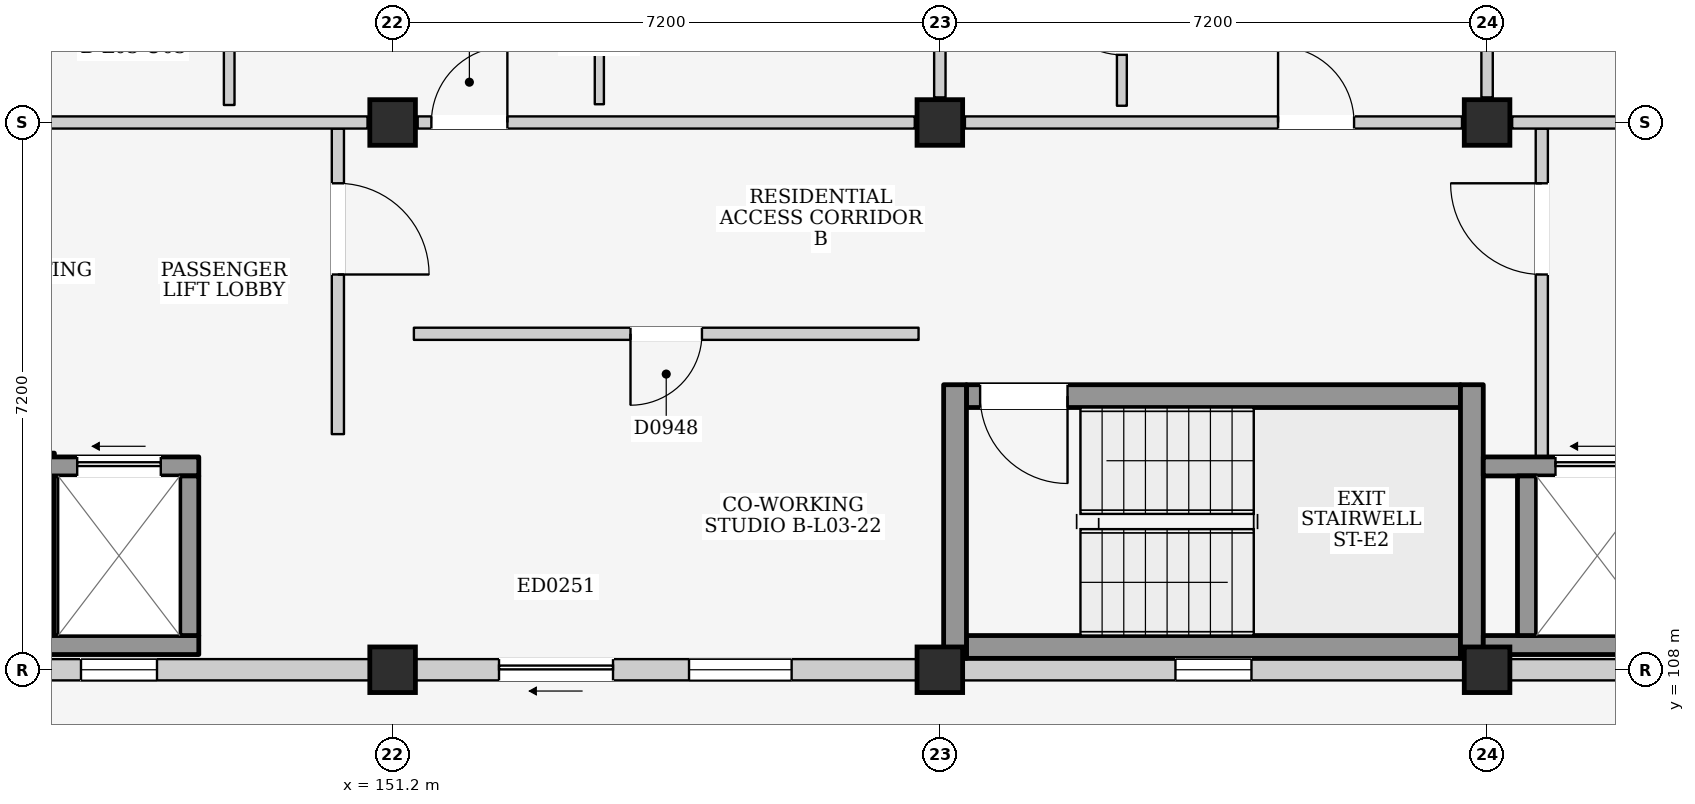
"""IFC4 building model, lengths in metres.
Left out: names, types, materials, properties, quantities, classifications, styles, units other than length and angle.
Written with IfcOpenShell. Run it as: python <this file> out.ifc"""

import sys

from ifc_helpers import new_model, si_unit, direction, frame, frame_2d, origin, origin_2d, place, context, subcontext, project, spatial, rectangle, extrude, element, fill, save


model = new_model("IFC4")
c1 = context("Model", 3, precision=1e-05, world=origin(), true_north=direction((0.0, 1.0)))
c2 = subcontext(c1, "Body", "Model", "MODEL_VIEW")
j1 = project(units=[si_unit("LENGTHUNIT", "METRE"), si_unit("PLANEANGLEUNIT", "RADIAN")], contexts=[c1])
p1 = place(None, origin())
s1 = spatial("IfcSite", under=j1, at=p1, CompositionType="ELEMENT")
p2 = place(p1, origin())
s2 = spatial("IfcBuilding", under=s1, at=p2, CompositionType="ELEMENT")
p3 = place(p2, frame((0.0, 0.0, 12.2)))
s3 = spatial("IfcBuildingStorey", under=s2, at=p3, CompositionType="ELEMENT", Elevation=12.2)
for number, where, z_axis, x_axis in (
    (1, (151.2, 108.0, 0.0), (0.0, 0.0, 1.0), (1.0, 0.0, 0.0)),
    (2, (151.2, 115.2, 0.0), (0.0, 0.0, 1.0), (1.0, 0.0, 0.0)),
    (3, (158.4, 108.0, 0.0), (0.0, 0.0, 1.0), (1.0, 0.0, 0.0)),
    (4, (158.4, 115.2, 0.0), (0.0, 0.0, 1.0), (1.0, 0.0, 0.0)),
    (5, (165.6, 108.0, 0.0), (0.0, 0.0, 1.0), (1.0, 0.0, 0.0)),
    (6, (165.6, 115.2, 0.0), (0.0, 0.0, 1.0), (1.0, 0.0, 0.0)),
):
    element("IfcColumn", number, at=place(p3, frame(where, z_axis=z_axis, x_axis=x_axis)), inside=s3, PredefinedType="COLUMN", context=c2, shape_type="SweptSolid", body=[
        extrude(rectangle(XDim=0.6, YDim=0.6, at=origin_2d()), origin(), (0.0, 0.0, 1.0), 3.2),
    ])
p4 = place(p3, frame((144.3, 108.0, 0.0), z_axis=(0.0, 0.0, 1.0), x_axis=(1.0, 0.0, 0.0)))
e7 = element("IfcWall", 7, at=p4, inside=s3, PredefinedType="ELEMENTEDWALL", context=c2, shape_type="SweptSolid", body=[
    extrude(rectangle(XDim=6.6, YDim=0.28, at=frame_2d((3.3, 0.0))), origin(), (0.0, 0.0, 1.0), 2.365),
])
p5 = place(p4, frame((2.8, 0.0, 1.2)))
e8 = element("IfcOpeningElement", 8, at=p5, cuts=e7, PredefinedType="OPENING", context=c2, shape_type="SweptSolid", body=[
    extrude(rectangle(XDim=1.0, YDim=0.9, at=frame_2d((0.5, 0.45))), frame((0.0, 0.155, 0.0), z_axis=(0.0, -1.0, 0.0), x_axis=(1.0, 0.0, 0.0)), (0.0, 0.0, 1.0), 0.31),
])
p6 = place(p3, frame((151.5, 108.0, 0.0), z_axis=(0.0, 0.0, 1.0), x_axis=(1.0, 0.0, 0.0)))
e9 = element("IfcWall", 9, at=p6, inside=s3, PredefinedType="ELEMENTEDWALL", context=c2, shape_type="SweptSolid", body=[
    extrude(rectangle(XDim=6.6, YDim=0.28, at=frame_2d((3.3, 0.0))), origin(), (0.0, 0.0, 1.0), 2.365),
])
p7 = place(p6, frame((1.1, 0.0, 0.0)))
e10 = element("IfcOpeningElement", 10, at=p7, cuts=e9, PredefinedType="OPENING", context=c2, shape_type="SweptSolid", body=[
    extrude(rectangle(XDim=1.5, YDim=2.12, at=frame_2d((0.75, 1.06))), frame((0.0, 0.155, 0.0), z_axis=(0.0, -1.0, 0.0), x_axis=(1.0, 0.0, 0.0)), (0.0, 0.0, 1.0), 0.31),
])
p8 = place(p6, frame((3.6, 0.0, 0.755)))
e11 = element("IfcOpeningElement", 11, at=p8, cuts=e9, PredefinedType="OPENING", context=c2, shape_type="SweptSolid", body=[
    extrude(rectangle(XDim=1.35, YDim=1.5, at=frame_2d((0.675, 0.75))), frame((0.0, 0.155, 0.0), z_axis=(0.0, -1.0, 0.0), x_axis=(1.0, 0.0, 0.0)), (0.0, 0.0, 1.0), 0.31),
])
p9 = place(p3, frame((158.7, 108.0, 0.0), z_axis=(0.0, 0.0, 1.0), x_axis=(1.0, 0.0, 0.0)))
e12 = element("IfcWall", 12, at=p9, inside=s3, PredefinedType="ELEMENTEDWALL", context=c2, shape_type="SweptSolid", body=[
    extrude(rectangle(XDim=6.6, YDim=0.28, at=frame_2d((3.3, 0.0))), origin(), (0.0, 0.0, 1.0), 2.365),
])
p10 = place(p9, frame((2.8, 0.0, 1.2)))
e13 = element("IfcOpeningElement", 13, at=p10, cuts=e12, PredefinedType="OPENING", context=c2, shape_type="SweptSolid", body=[
    extrude(rectangle(XDim=1.0, YDim=0.9, at=frame_2d((0.5, 0.45))), frame((0.0, 0.155, 0.0), z_axis=(0.0, -1.0, 0.0), x_axis=(1.0, 0.0, 0.0)), (0.0, 0.0, 1.0), 0.31),
])
p11 = place(p3, frame((165.9, 108.0, 0.0), z_axis=(0.0, 0.0, 1.0), x_axis=(1.0, 0.0, 0.0)))
e14 = element("IfcWall", 14, at=p11, inside=s3, PredefinedType="ELEMENTEDWALL", context=c2, shape_type="SweptSolid", body=[
    extrude(rectangle(XDim=6.6, YDim=0.28, at=frame_2d((3.3, 0.0))), origin(), (0.0, 0.0, 1.0), 2.365),
])
p12 = place(p11, frame((2.8, 0.0, 1.2)))
e15 = element("IfcOpeningElement", 15, at=p12, cuts=e14, PredefinedType="OPENING", context=c2, shape_type="SweptSolid", body=[
    extrude(rectangle(XDim=1.0, YDim=0.9, at=frame_2d((0.5, 0.45))), frame((0.0, 0.155, 0.0), z_axis=(0.0, -1.0, 0.0), x_axis=(1.0, 0.0, 0.0)), (0.0, 0.0, 1.0), 0.31),
])
p13 = place(p3, frame((150.48, 111.1, 0.0), z_axis=(0.0, 0.0, 1.0), x_axis=(0.0, 1.0, 0.0)))
e16 = element("IfcWall", 16, at=p13, inside=s3, PredefinedType="PARTITIONING", context=c2, shape_type="SweptSolid", body=[
    extrude(rectangle(XDim=4.02, YDim=0.16, at=frame_2d((2.01, 0.0))), origin(), (0.0, 0.0, 1.0), 2.98),
])
p14 = place(p13, frame((2.1, 0.0, 0.0)))
e17 = element("IfcOpeningElement", 17, at=p14, cuts=e16, PredefinedType="OPENING", context=c2, shape_type="SweptSolid", body=[
    extrude(rectangle(XDim=1.2, YDim=2.2, at=frame_2d((0.6, 1.1))), frame((0.0, 0.095, 0.0), z_axis=(0.0, -1.0, 0.0), x_axis=(1.0, 0.0, 0.0)), (0.0, 0.0, 1.0), 0.19),
])
p15 = place(p3, frame((146.625, 108.45, 0.0), z_axis=(0.0, 0.0, 1.0), x_axis=(0.0, 1.0, 0.0)))
e18 = element("IfcWall", 18, at=p15, inside=s3, PredefinedType="SHEAR", context=c2, shape_type="SweptSolid", body=[
    extrude(rectangle(XDim=2.4, YDim=0.25, at=frame_2d((1.2, 0.0))), origin(), (0.0, 0.0, 1.0), 2.98),
])
p16 = place(p3, frame((146.625, 108.325, 0.0), z_axis=(0.0, 0.0, 1.0), x_axis=(1.0, 0.0, 0.0)))
e19 = element("IfcWall", 19, at=p16, inside=s3, PredefinedType="SHEAR", context=c2, shape_type="SweptSolid", body=[
    extrude(rectangle(XDim=2.025, YDim=0.25, at=frame_2d((1.012, 0.0))), origin(), (0.0, 0.0, 1.0), 2.98),
])
p17 = place(p3, frame((146.625, 110.675, 0.0), z_axis=(0.0, 0.0, 1.0), x_axis=(1.0, 0.0, 0.0)))
e20 = element("IfcWall", 20, at=p17, inside=s3, PredefinedType="SHEAR", context=c2, shape_type="SweptSolid", body=[
    extrude(rectangle(XDim=2.025, YDim=0.25, at=frame_2d((1.012, 0.0))), origin(), (0.0, 0.0, 1.0), 2.98),
])
p18 = place(p17, frame((0.425, 0.0, 0.0)))
e21 = element("IfcOpeningElement", 21, at=p18, cuts=e20, PredefinedType="OPENING", context=c2, shape_type="SweptSolid", body=[
    extrude(rectangle(XDim=1.1, YDim=2.15, at=frame_2d((0.55, 1.075))), frame((0.0, 0.14, 0.0), z_axis=(0.0, -1.0, 0.0), x_axis=(1.0, 0.0, 0.0)), (0.0, 0.0, 1.0), 0.28),
])
p19 = place(p3, frame((148.525, 108.45, 0.0), z_axis=(0.0, 0.0, 1.0), x_axis=(0.0, 1.0, 0.0)))
e22 = element("IfcWall", 22, at=p19, inside=s3, PredefinedType="SHEAR", context=c2, shape_type="SweptSolid", body=[
    extrude(rectangle(XDim=2.1, YDim=0.25, at=frame_2d((1.05, 0.0))), origin(), (0.0, 0.0, 1.0), 2.98),
])
p20 = place(p3, frame((158.75, 108.3, 0.0), z_axis=(0.0, 0.0, 1.0), x_axis=(1.0, 0.0, 0.0)))
e23 = element("IfcWall", 23, at=p20, inside=s3, PredefinedType="SHEAR", context=c2, shape_type="SweptSolid", body=[
    extrude(rectangle(XDim=6.5, YDim=0.3, at=frame_2d((3.25, 0.0))), origin(), (0.0, 0.0, 1.0), 2.98),
])
p21 = place(p3, frame((158.75, 111.6, 0.0), z_axis=(0.0, 0.0, 1.0), x_axis=(1.0, 0.0, 0.0)))
e24 = element("IfcWall", 24, at=p21, inside=s3, PredefinedType="SHEAR", context=c2, shape_type="SweptSolid", body=[
    extrude(rectangle(XDim=6.5, YDim=0.3, at=frame_2d((3.25, 0.0))), origin(), (0.0, 0.0, 1.0), 2.98),
])
p22 = place(p21, frame((0.18, 0.0, 0.0)))
e25 = element("IfcOpeningElement", 25, at=p22, cuts=e24, PredefinedType="OPENING", context=c2, shape_type="SweptSolid", body=[
    extrude(rectangle(XDim=1.15, YDim=2.2, at=frame_2d((0.575, 1.1))), frame((0.0, 0.165, 0.0), z_axis=(0.0, -1.0, 0.0), x_axis=(1.0, 0.0, 0.0)), (0.0, 0.0, 1.0), 0.33),
])
for number, where, z_axis, x_axis in (
    (26, (158.6, 108.15, 0.0), (0.0, 0.0, 1.0), (0.0, 1.0, 0.0)),
    (27, (165.4, 108.15, 0.0), (0.0, 0.0, 1.0), (0.0, 1.0, 0.0)),
):
    element("IfcWall", number, at=place(p3, frame(where, z_axis=z_axis, x_axis=x_axis)), inside=s3, PredefinedType="SHEAR", context=c2, shape_type="SweptSolid", body=[
        extrude(rectangle(XDim=3.6, YDim=0.3, at=frame_2d((1.8, 0.0))), origin(), (0.0, 0.0, 1.0), 2.98),
    ])
p23 = place(p3, frame((166.32, 110.8, 0.0), z_axis=(0.0, 0.0, 1.0), x_axis=(0.0, 1.0, 0.0)))
e28 = element("IfcWall", 28, at=p23, inside=s3, PredefinedType="PARTITIONING", context=c2, shape_type="SweptSolid", body=[
    extrude(rectangle(XDim=4.32, YDim=0.16, at=frame_2d((2.16, 0.0))), origin(), (0.0, 0.0, 1.0), 2.98),
])
p24 = place(p23, frame((2.4, 0.0, 0.0)))
e29 = element("IfcOpeningElement", 29, at=p24, cuts=e28, PredefinedType="OPENING", context=c2, shape_type="SweptSolid", body=[
    extrude(rectangle(XDim=1.2, YDim=2.2, at=frame_2d((0.6, 1.1))), frame((0.0, 0.095, 0.0), z_axis=(0.0, -1.0, 0.0), x_axis=(1.0, 0.0, 0.0)), (0.0, 0.0, 1.0), 0.19),
])
p25 = place(p3, frame((165.55, 108.325, 0.0), z_axis=(0.0, 0.0, 1.0), x_axis=(1.0, 0.0, 0.0)))
e30 = element("IfcWall", 30, at=p25, inside=s3, PredefinedType="SHEAR", context=c2, shape_type="SweptSolid", body=[
    extrude(rectangle(XDim=2.55, YDim=0.25, at=frame_2d((1.275, 0.0))), origin(), (0.0, 0.0, 1.0), 2.98),
])
p26 = place(p3, frame((165.55, 110.675, 0.0), z_axis=(0.0, 0.0, 1.0), x_axis=(1.0, 0.0, 0.0)))
e31 = element("IfcWall", 31, at=p26, inside=s3, PredefinedType="SHEAR", context=c2, shape_type="SweptSolid", body=[
    extrude(rectangle(XDim=2.55, YDim=0.25, at=frame_2d((1.275, 0.0))), origin(), (0.0, 0.0, 1.0), 2.98),
])
p27 = place(p26, frame((0.95, 0.0, 0.0)))
e32 = element("IfcOpeningElement", 32, at=p27, cuts=e31, PredefinedType="OPENING", context=c2, shape_type="SweptSolid", body=[
    extrude(rectangle(XDim=1.1, YDim=2.15, at=frame_2d((0.55, 1.075))), frame((0.0, 0.14, 0.0), z_axis=(0.0, -1.0, 0.0), x_axis=(1.0, 0.0, 0.0)), (0.0, 0.0, 1.0), 0.28),
])
p28 = place(p3, frame((166.125, 108.45, 0.0), z_axis=(0.0, 0.0, 1.0), x_axis=(0.0, 1.0, 0.0)))
e33 = element("IfcWall", 33, at=p28, inside=s3, PredefinedType="SHEAR", context=c2, shape_type="SweptSolid", body=[
    extrude(rectangle(XDim=2.1, YDim=0.25, at=frame_2d((1.05, 0.0))), origin(), (0.0, 0.0, 1.0), 2.98),
])
p29 = place(p3, frame((144.33, 115.2, 0.0), z_axis=(0.0, 0.0, 1.0), x_axis=(1.0, 0.0, 0.0)))
e34 = element("IfcWall", 34, at=p29, inside=s3, PredefinedType="PARTITIONING", context=c2, shape_type="SweptSolid", body=[
    extrude(rectangle(XDim=6.54, YDim=0.16, at=frame_2d((3.27, 0.0))), origin(), (0.0, 0.0, 1.0), 2.365),
])
p30 = place(p3, frame((151.53, 115.2, 0.0), z_axis=(0.0, 0.0, 1.0), x_axis=(1.0, 0.0, 0.0)))
e35 = element("IfcWall", 35, at=p30, inside=s3, PredefinedType="PARTITIONING", context=c2, shape_type="SweptSolid", body=[
    extrude(rectangle(XDim=6.54, YDim=0.16, at=frame_2d((3.27, 0.0))), origin(), (0.0, 0.0, 1.0), 2.365),
])
p31 = place(p30, frame((0.18, 0.0, 0.0)))
e36 = element("IfcOpeningElement", 36, at=p31, cuts=e35, PredefinedType="OPENING", context=c2, shape_type="SweptSolid", body=[
    extrude(rectangle(XDim=1.0, YDim=2.15, at=frame_2d((0.5, 1.075))), frame((0.0, 0.095, 0.0), z_axis=(0.0, -1.0, 0.0), x_axis=(1.0, 0.0, 0.0)), (0.0, 0.0, 1.0), 0.19),
])
p32 = place(p3, frame((158.4, 115.53, 0.0), z_axis=(0.0, 0.0, 1.0), x_axis=(0.0, 1.0, 0.0)))
e37 = element("IfcWall", 37, at=p32, inside=s3, PredefinedType="PARTITIONING", context=c2, shape_type="SweptSolid", body=[
    extrude(rectangle(XDim=6.54, YDim=0.15, at=frame_2d((3.27, 0.0))), origin(), (0.0, 0.0, 1.0), 2.415),
])
p33 = place(p3, frame((149.05, 115.43, 0.0), z_axis=(0.0, 0.0, 1.0), x_axis=(0.0, 1.0, 0.0)))
e38 = element("IfcWall", 38, at=p33, inside=s3, PredefinedType="PARTITIONING", context=c2, shape_type="SweptSolid", body=[
    extrude(rectangle(XDim=3.06, YDim=0.14, at=frame_2d((1.53, 0.0))), origin(), (0.0, 0.0, 1.0), 2.98),
])
p34 = place(p3, frame((153.92, 115.44, 0.0), z_axis=(0.0, 0.0, 1.0), x_axis=(0.0, 1.0, 0.0)))
e39 = element("IfcWall", 39, at=p34, inside=s3, PredefinedType="PARTITIONING", context=c2, shape_type="SweptSolid", body=[
    extrude(rectangle(XDim=3.04, YDim=0.12, at=frame_2d((1.52, 0.0))), origin(), (0.0, 0.0, 1.0), 2.98),
])
p35 = place(p34, frame((1.04, 0.0, 0.0)))
e40 = element("IfcOpeningElement", 40, at=p35, cuts=e39, PredefinedType="OPENING", context=c2, shape_type="SweptSolid", body=[
    extrude(rectangle(XDim=0.96, YDim=2.15, at=frame_2d((0.48, 1.075))), frame((0.0, 0.075, 0.0), z_axis=(0.0, -1.0, 0.0), x_axis=(1.0, 0.0, 0.0)), (0.0, 0.0, 1.0), 0.15),
])
p36 = place(p3, frame((158.73, 115.2, 0.0), z_axis=(0.0, 0.0, 1.0), x_axis=(1.0, 0.0, 0.0)))
e41 = element("IfcWall", 41, at=p36, inside=s3, PredefinedType="PARTITIONING", context=c2, shape_type="SweptSolid", body=[
    extrude(rectangle(XDim=6.54, YDim=0.16, at=frame_2d((3.27, 0.0))), origin(), (0.0, 0.0, 1.0), 2.365),
])
p37 = place(p36, frame((4.12, 0.0, 0.0)))
e42 = element("IfcOpeningElement", 42, at=p37, cuts=e41, PredefinedType="OPENING", context=c2, shape_type="SweptSolid", body=[
    extrude(rectangle(XDim=1.0, YDim=2.15, at=frame_2d((0.5, 1.075))), frame((0.0, 0.095, 0.0), z_axis=(0.0, -1.0, 0.0), x_axis=(1.0, 0.0, 0.0)), (0.0, 0.0, 1.0), 0.19),
])
p38 = place(p3, frame((165.6, 115.53, 0.0), z_axis=(0.0, 0.0, 1.0), x_axis=(0.0, 1.0, 0.0)))
e43 = element("IfcWall", 43, at=p38, inside=s3, PredefinedType="PARTITIONING", context=c2, shape_type="SweptSolid", body=[
    extrude(rectangle(XDim=6.54, YDim=0.15, at=frame_2d((3.27, 0.0))), origin(), (0.0, 0.0, 1.0), 2.415),
])
p39 = place(p3, frame((160.795, 115.42, 0.0), z_axis=(0.0, 0.0, 1.0), x_axis=(0.0, 1.0, 0.0)))
e44 = element("IfcWall", 44, at=p39, inside=s3, PredefinedType="PARTITIONING", context=c2, shape_type="SweptSolid", body=[
    extrude(rectangle(XDim=2.22, YDim=0.13, at=frame_2d((1.11, 0.0))), origin(), (0.0, 0.0, 1.0), 2.98),
])
p40 = place(p39, frame((0.67, 0.0, 0.0)))
e45 = element("IfcOpeningElement", 45, at=p40, cuts=e44, PredefinedType="OPENING", context=c2, shape_type="SweptSolid", body=[
    extrude(rectangle(XDim=0.88, YDim=2.1, at=frame_2d((0.44, 1.05))), frame((0.0, 0.08, 0.0), z_axis=(0.0, -1.0, 0.0), x_axis=(1.0, 0.0, 0.0)), (0.0, 0.0, 1.0), 0.16),
])
p41 = place(p3, frame((165.93, 115.2, 0.0), z_axis=(0.0, 0.0, 1.0), x_axis=(1.0, 0.0, 0.0)))
e46 = element("IfcWall", 46, at=p41, inside=s3, PredefinedType="PARTITIONING", context=c2, shape_type="SweptSolid", body=[
    extrude(rectangle(XDim=6.54, YDim=0.16, at=frame_2d((3.27, 0.0))), origin(), (0.0, 0.0, 1.0), 2.365),
])
p42 = place(p3, frame((151.48, 112.42, 0.0), z_axis=(0.0, 0.0, 1.0), x_axis=(1.0, 0.0, 0.0)))
e47 = element("IfcWall", 47, at=p42, inside=s3, PredefinedType="PARTITIONING", context=c2, shape_type="SweptSolid", body=[
    extrude(rectangle(XDim=6.64, YDim=0.16, at=frame_2d((3.32, 0.0))), origin(), (0.0, 0.0, 1.0), 2.98),
])
p43 = place(p42, frame((2.85, 0.0, 0.0)))
e48 = element("IfcOpeningElement", 48, at=p43, cuts=e47, PredefinedType="OPENING", context=c2, shape_type="SweptSolid", body=[
    extrude(rectangle(XDim=0.94, YDim=2.12, at=frame_2d((0.47, 1.06))), frame((0.0, 0.095, 0.0), z_axis=(0.0, -1.0, 0.0), x_axis=(1.0, 0.0, 0.0)), (0.0, 0.0, 1.0), 0.19),
])
p44 = place(p5, origin())
e49 = element("IfcWindow", 49, at=p44, inside=s3, PartitioningType="SINGLE_PANEL", PredefinedType="WINDOW", context=c2, shape_type="SweptSolid", body=[
    extrude(rectangle(XDim=1.0, YDim=0.9, at=frame_2d((0.5, 0.45))), frame((0.0, 0.03, 0.0), z_axis=(0.0, -1.0, 0.0), x_axis=(1.0, 0.0, 0.0)), (0.0, 0.0, 1.0), 0.06),
])
fill(e8, e49)
p45 = place(p7, frame((1.5, 0.0, 0.0), z_axis=(0.0, 0.0, 1.0), x_axis=(-1.0, 0.0, 0.0)))
e50 = element("IfcDoor", 50, at=p45, inside=s3, OperationType="SLIDING_TO_LEFT", PredefinedType="DOOR", context=c2, shape_type="SweptSolid", body=[
    extrude(rectangle(XDim=1.5, YDim=2.12, at=frame_2d((0.75, 1.06))), frame((0.0, 0.025, 0.0), z_axis=(0.0, -1.0, 0.0), x_axis=(1.0, 0.0, 0.0)), (0.0, 0.0, 1.0), 0.05),
])
fill(e10, e50)
p46 = place(p8, origin())
e51 = element("IfcWindow", 51, at=p46, inside=s3, PartitioningType="SINGLE_PANEL", PredefinedType="WINDOW", context=c2, shape_type="SweptSolid", body=[
    extrude(rectangle(XDim=1.35, YDim=1.5, at=frame_2d((0.675, 0.75))), frame((0.0, 0.03, 0.0), z_axis=(0.0, -1.0, 0.0), x_axis=(1.0, 0.0, 0.0)), (0.0, 0.0, 1.0), 0.06),
])
fill(e11, e51)
p47 = place(p10, origin())
e52 = element("IfcWindow", 52, at=p47, inside=s3, PartitioningType="SINGLE_PANEL", PredefinedType="WINDOW", context=c2, shape_type="SweptSolid", body=[
    extrude(rectangle(XDim=1.0, YDim=0.9, at=frame_2d((0.5, 0.45))), frame((0.0, 0.03, 0.0), z_axis=(0.0, -1.0, 0.0), x_axis=(1.0, 0.0, 0.0)), (0.0, 0.0, 1.0), 0.06),
])
fill(e13, e52)
p48 = place(p14, frame((1.2, 0.0, 0.0), z_axis=(0.0, 0.0, 1.0), x_axis=(-1.0, 0.0, 0.0)))
e53 = element("IfcDoor", 53, at=p48, inside=s3, OperationType="SINGLE_SWING_RIGHT", PredefinedType="DOOR", context=c2, shape_type="SweptSolid", body=[
    extrude(rectangle(XDim=1.2, YDim=2.2, at=frame_2d((0.6, 1.1))), frame((0.0, 0.025, 0.0), z_axis=(0.0, -1.0, 0.0), x_axis=(1.0, 0.0, 0.0)), (0.0, 0.0, 1.0), 0.05),
])
fill(e17, e53)
p49 = place(p18, origin())
e54 = element("IfcDoor", 54, at=p49, inside=s3, OperationType="SLIDING_TO_LEFT", PredefinedType="DOOR", context=c2, shape_type="SweptSolid", body=[
    extrude(rectangle(XDim=1.1, YDim=2.15, at=frame_2d((0.55, 1.075))), frame((0.0, 0.025, 0.0), z_axis=(0.0, -1.0, 0.0), x_axis=(1.0, 0.0, 0.0)), (0.0, 0.0, 1.0), 0.05),
])
fill(e21, e54)
p50 = place(p22, frame((1.15, 0.0, 0.0), z_axis=(0.0, 0.0, 1.0), x_axis=(-1.0, 0.0, 0.0)))
e55 = element("IfcDoor", 55, at=p50, inside=s3, OperationType="SINGLE_SWING_LEFT", PredefinedType="DOOR", context=c2, shape_type="SweptSolid", body=[
    extrude(rectangle(XDim=1.15, YDim=2.2, at=frame_2d((0.575, 1.1))), frame((0.0, 0.025, 0.0), z_axis=(0.0, -1.0, 0.0), x_axis=(1.0, 0.0, 0.0)), (0.0, 0.0, 1.0), 0.05),
])
fill(e25, e55)
p51 = place(p24, origin())
e56 = element("IfcDoor", 56, at=p51, inside=s3, OperationType="SINGLE_SWING_RIGHT", PredefinedType="DOOR", context=c2, shape_type="SweptSolid", body=[
    extrude(rectangle(XDim=1.2, YDim=2.2, at=frame_2d((0.6, 1.1))), frame((0.0, 0.025, 0.0), z_axis=(0.0, -1.0, 0.0), x_axis=(1.0, 0.0, 0.0)), (0.0, 0.0, 1.0), 0.05),
])
fill(e29, e56)
p52 = place(p27, origin())
e57 = element("IfcDoor", 57, at=p52, inside=s3, OperationType="SLIDING_TO_LEFT", PredefinedType="DOOR", context=c2, shape_type="SweptSolid", body=[
    extrude(rectangle(XDim=1.1, YDim=2.15, at=frame_2d((0.55, 1.075))), frame((0.0, 0.025, 0.0), z_axis=(0.0, -1.0, 0.0), x_axis=(1.0, 0.0, 0.0)), (0.0, 0.0, 1.0), 0.05),
])
fill(e32, e57)
p53 = place(p31, origin())
e58 = element("IfcDoor", 58, at=p53, inside=s3, OperationType="SINGLE_SWING_RIGHT", PredefinedType="DOOR", context=c2, shape_type="SweptSolid", body=[
    extrude(rectangle(XDim=1.0, YDim=2.15, at=frame_2d((0.5, 1.075))), frame((0.0, 0.025, 0.0), z_axis=(0.0, -1.0, 0.0), x_axis=(1.0, 0.0, 0.0)), (0.0, 0.0, 1.0), 0.05),
])
fill(e36, e58)
p54 = place(p37, origin())
e59 = element("IfcDoor", 59, at=p54, inside=s3, OperationType="SINGLE_SWING_LEFT", PredefinedType="DOOR", context=c2, shape_type="SweptSolid", body=[
    extrude(rectangle(XDim=1.0, YDim=2.15, at=frame_2d((0.5, 1.075))), frame((0.0, 0.025, 0.0), z_axis=(0.0, -1.0, 0.0), x_axis=(1.0, 0.0, 0.0)), (0.0, 0.0, 1.0), 0.05),
])
fill(e42, e59)
p55 = place(p40, origin())
e60 = element("IfcDoor", 60, at=p55, inside=s3, OperationType="SINGLE_SWING_RIGHT", PredefinedType="DOOR", context=c2, shape_type="SweptSolid", body=[
    extrude(rectangle(XDim=0.88, YDim=2.1, at=frame_2d((0.44, 1.05))), frame((0.0, 0.025, 0.0), z_axis=(0.0, -1.0, 0.0), x_axis=(1.0, 0.0, 0.0)), (0.0, 0.0, 1.0), 0.05),
])
fill(e45, e60)
p56 = place(p43, frame((0.94, 0.0, 0.0), z_axis=(0.0, 0.0, 1.0), x_axis=(-1.0, 0.0, 0.0)))
e61 = element("IfcDoor", 61, at=p56, inside=s3, OperationType="SINGLE_SWING_RIGHT", PredefinedType="DOOR", context=c2, shape_type="SweptSolid", body=[
    extrude(rectangle(XDim=0.94, YDim=2.12, at=frame_2d((0.47, 1.06))), frame((0.0, 0.025, 0.0), z_axis=(0.0, -1.0, 0.0), x_axis=(1.0, 0.0, 0.0)), (0.0, 0.0, 1.0), 0.05),
])
fill(e48, e61)
save(model, sys.argv[1])
